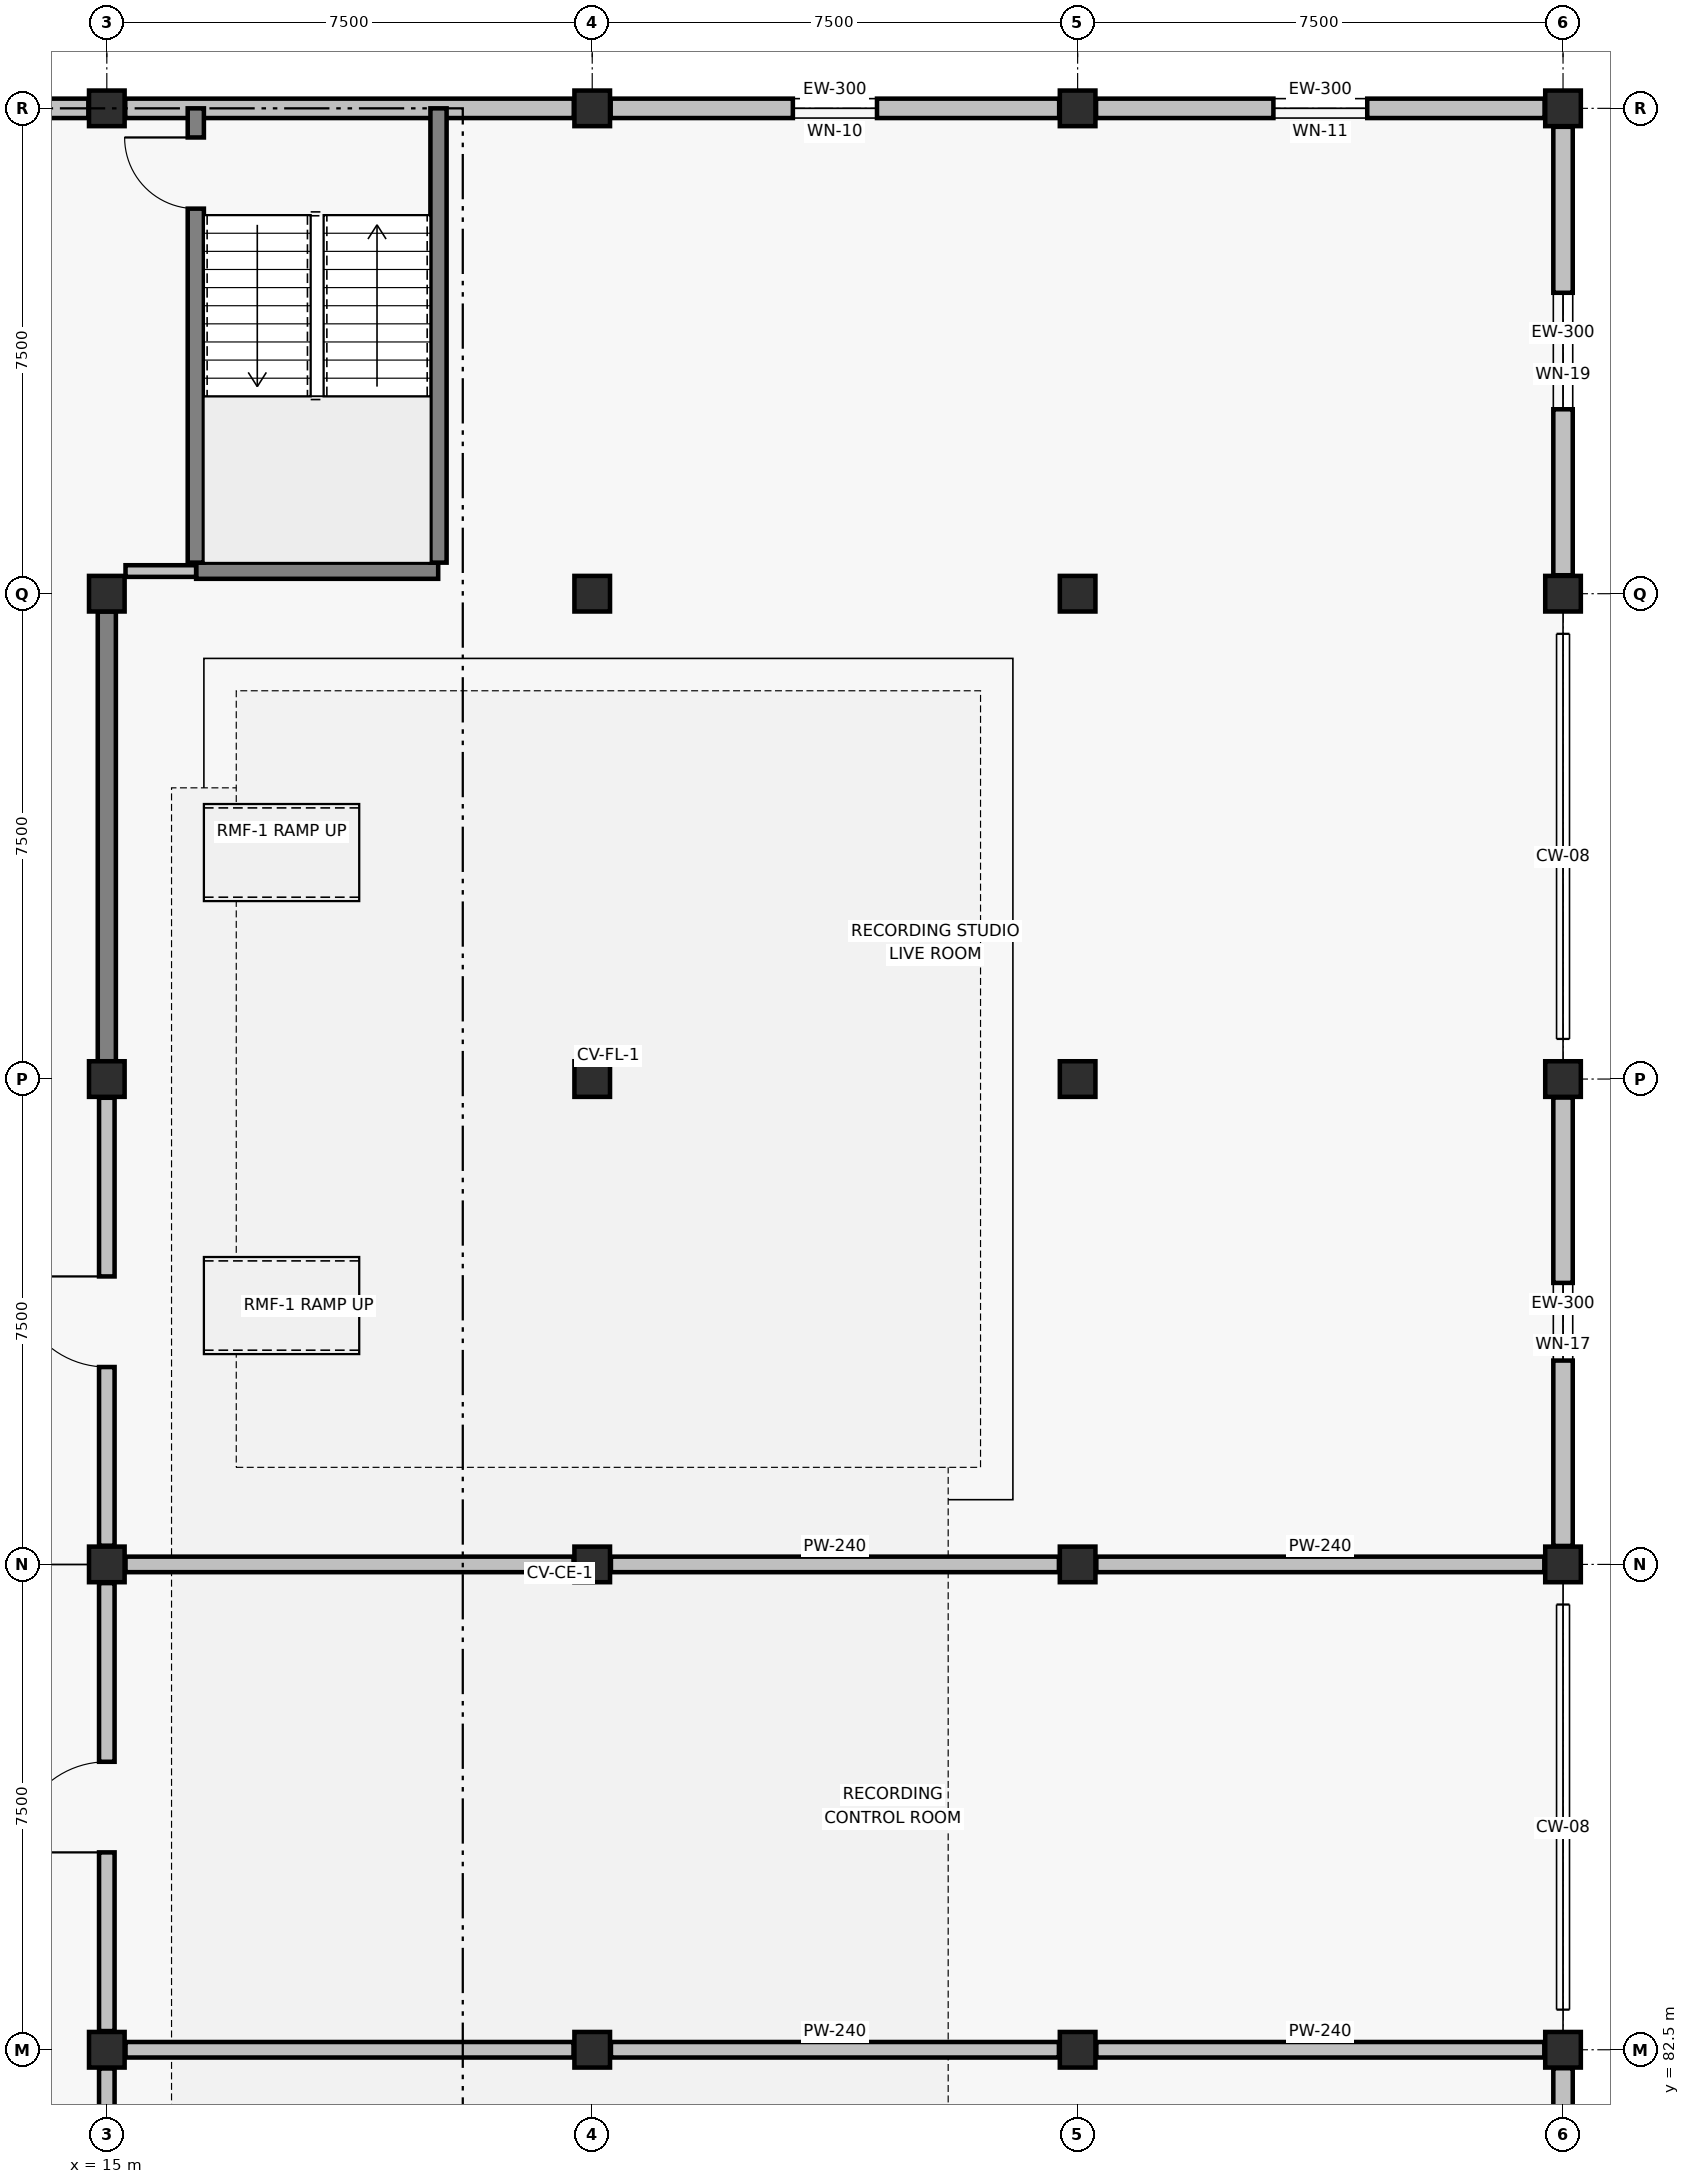
"""IFC4 building model, lengths in metres.
Left out: names, types, materials, properties, quantities, classifications, styles, units other than length and angle.
Written with IfcOpenShell. Run it as: python <this file> out.ifc"""

import sys

from ifc_helpers import new_model, si_unit, direction, frame, frame_2d, origin, origin_2d, place, context, subcontext, project, spatial, rectangle, extrude, element, fill, save


model = new_model("IFC4")
c1 = context("Model", 3, precision=1e-05, world=origin(), true_north=direction((0.0, 1.0)))
c2 = subcontext(c1, "Body", "Model", "MODEL_VIEW")
j1 = project(units=[si_unit("LENGTHUNIT", "METRE"), si_unit("PLANEANGLEUNIT", "RADIAN")], contexts=[c1])
p1 = place(None, origin())
s1 = spatial("IfcSite", under=j1, at=p1, CompositionType="ELEMENT")
p2 = place(p1, origin())
s2 = spatial("IfcBuilding", under=s1, at=p2, CompositionType="ELEMENT")
p3 = place(p2, frame((0.0, 0.0, 13.2)))
s3 = spatial("IfcBuildingStorey", under=s2, at=p3, CompositionType="ELEMENT", Elevation=13.2)
for number, where, z_axis, x_axis in (
    (1, (15.0, 82.5, 0.0), (0.0, 0.0, 1.0), (1.0, 0.0, 0.0)),
    (2, (15.0, 90.0, 0.0), (0.0, 0.0, 1.0), (1.0, 0.0, 0.0)),
    (3, (15.0, 97.5, 0.0), (0.0, 0.0, 1.0), (1.0, 0.0, 0.0)),
    (4, (15.0, 105.0, 0.0), (0.0, 0.0, 1.0), (1.0, 0.0, 0.0)),
    (5, (15.0, 112.5, 0.0), (0.0, 0.0, 1.0), (1.0, 0.0, 0.0)),
    (6, (22.5, 82.5, 0.0), (0.0, 0.0, 1.0), (1.0, 0.0, 0.0)),
    (7, (22.5, 90.0, 0.0), (0.0, 0.0, 1.0), (1.0, 0.0, 0.0)),
    (8, (22.5, 97.5, 0.0), (0.0, 0.0, 1.0), (1.0, 0.0, 0.0)),
    (9, (22.5, 105.0, 0.0), (0.0, 0.0, 1.0), (1.0, 0.0, 0.0)),
    (10, (22.5, 112.5, 0.0), (0.0, 0.0, 1.0), (1.0, 0.0, 0.0)),
    (11, (30.0, 82.5, 0.0), (0.0, 0.0, 1.0), (1.0, 0.0, 0.0)),
    (12, (30.0, 90.0, 0.0), (0.0, 0.0, 1.0), (1.0, 0.0, 0.0)),
    (13, (30.0, 97.5, 0.0), (0.0, 0.0, 1.0), (1.0, 0.0, 0.0)),
    (14, (30.0, 105.0, 0.0), (0.0, 0.0, 1.0), (1.0, 0.0, 0.0)),
    (15, (30.0, 112.5, 0.0), (0.0, 0.0, 1.0), (1.0, 0.0, 0.0)),
    (16, (37.5, 82.5, 0.0), (0.0, 0.0, 1.0), (1.0, 0.0, 0.0)),
    (17, (37.5, 90.0, 0.0), (0.0, 0.0, 1.0), (1.0, 0.0, 0.0)),
    (18, (37.5, 97.5, 0.0), (0.0, 0.0, 1.0), (1.0, 0.0, 0.0)),
    (19, (37.5, 105.0, 0.0), (0.0, 0.0, 1.0), (1.0, 0.0, 0.0)),
    (20, (37.5, 112.5, 0.0), (0.0, 0.0, 1.0), (1.0, 0.0, 0.0)),
):
    element("IfcColumn", number, at=place(p3, frame(where, z_axis=z_axis, x_axis=x_axis)), inside=s3, PredefinedType="COLUMN", context=c2, shape_type="SweptSolid", body=[
        extrude(rectangle(XDim=0.55, YDim=0.55, at=origin_2d()), origin(), (0.0, 0.0, 1.0), 3.9),
    ])
p4 = place(p3, frame((15.0, 97.775, 0.0), z_axis=(0.0, 0.0, 1.0), x_axis=(0.0, 1.0, 0.0)))
e21 = element("IfcWall", 21, at=p4, inside=s3, PredefinedType="SHEAR", context=c2, shape_type="SweptSolid", body=[
    extrude(rectangle(XDim=6.95, YDim=0.28, at=frame_2d((3.475, 0.0))), origin(), (0.0, 0.0, 1.0), 3.6),
])
p5 = place(p3, frame((8.12, 112.5, 0.0), z_axis=(0.0, 0.0, 1.0), x_axis=(1.0, 0.0, 0.0)))
e22 = element("IfcWall", 22, at=p5, inside=s3, PredefinedType="SOLIDWALL", context=c2, shape_type="SweptSolid", body=[
    extrude(rectangle(XDim=6.595, YDim=0.3, at=frame_2d((3.297, 0.0))), origin(), (0.0, 0.0, 1.0), 2.59),
])
p6 = place(p5, frame((2.055, 0.0, 0.6)))
e23 = element("IfcOpeningElement", 23, at=p6, cuts=e22, PredefinedType="OPENING", context=c2, shape_type="SweptSolid", body=[
    extrude(rectangle(XDim=2.15, YDim=1.45, at=frame_2d((1.075, 0.725))), frame((0.0, 0.16, 0.0), z_axis=(0.0, -1.0, 0.0), x_axis=(1.0, 0.0, 0.0)), (0.0, 0.0, 1.0), 0.32),
])
p7 = place(p3, frame((15.285, 112.5, 0.0), z_axis=(0.0, 0.0, 1.0), x_axis=(1.0, 0.0, 0.0)))
e24 = element("IfcWall", 24, at=p7, inside=s3, PredefinedType="SOLIDWALL", context=c2, shape_type="SweptSolid", body=[
    extrude(rectangle(XDim=6.93, YDim=0.3, at=frame_2d((3.465, 0.0))), origin(), (0.0, 0.0, 1.0), 2.59),
])
p8 = place(p3, frame((22.785, 112.5, 0.0), z_axis=(0.0, 0.0, 1.0), x_axis=(1.0, 0.0, 0.0)))
e25 = element("IfcWall", 25, at=p8, inside=s3, PredefinedType="SOLIDWALL", context=c2, shape_type="SweptSolid", body=[
    extrude(rectangle(XDim=6.93, YDim=0.3, at=frame_2d((3.465, 0.0))), origin(), (0.0, 0.0, 1.0), 2.84),
])
p9 = place(p8, frame((2.815, 0.0, 0.6)))
e26 = element("IfcOpeningElement", 26, at=p9, cuts=e25, PredefinedType="OPENING", context=c2, shape_type="SweptSolid", body=[
    extrude(rectangle(XDim=1.3, YDim=1.3, at=frame_2d((0.65, 0.65))), frame((0.0, 0.16, 0.0), z_axis=(0.0, -1.0, 0.0), x_axis=(1.0, 0.0, 0.0)), (0.0, 0.0, 1.0), 0.32),
])
p10 = place(p3, frame((30.285, 112.5, 0.0), z_axis=(0.0, 0.0, 1.0), x_axis=(1.0, 0.0, 0.0)))
e27 = element("IfcWall", 27, at=p10, inside=s3, PredefinedType="SOLIDWALL", context=c2, shape_type="SweptSolid", body=[
    extrude(rectangle(XDim=6.93, YDim=0.3, at=frame_2d((3.465, 0.0))), origin(), (0.0, 0.0, 1.0), 2.84),
])
p11 = place(p10, frame((2.74, 0.0, 0.6)))
e28 = element("IfcOpeningElement", 28, at=p11, cuts=e27, PredefinedType="OPENING", context=c2, shape_type="SweptSolid", body=[
    extrude(rectangle(XDim=1.45, YDim=1.3, at=frame_2d((0.725, 0.65))), frame((0.0, 0.16, 0.0), z_axis=(0.0, -1.0, 0.0), x_axis=(1.0, 0.0, 0.0)), (0.0, 0.0, 1.0), 0.32),
])
p12 = place(p3, frame((37.5, 75.285, 0.0), z_axis=(0.0, 0.0, 1.0), x_axis=(0.0, 1.0, 0.0)))
e29 = element("IfcWall", 29, at=p12, inside=s3, PredefinedType="SOLIDWALL", context=c2, shape_type="SweptSolid", body=[
    extrude(rectangle(XDim=6.93, YDim=0.3, at=frame_2d((3.465, 0.0))), origin(), (0.0, 0.0, 1.0), 2.54),
])
p13 = place(p12, frame((2.415, 0.0, 0.6)))
e30 = element("IfcOpeningElement", 30, at=p13, cuts=e29, PredefinedType="OPENING", context=c2, shape_type="SweptSolid", body=[
    extrude(rectangle(XDim=2.1, YDim=1.3, at=frame_2d((1.05, 0.65))), frame((0.0, 0.16, 0.0), z_axis=(0.0, -1.0, 0.0), x_axis=(1.0, 0.0, 0.0)), (0.0, 0.0, 1.0), 0.32),
])
p14 = place(p3, frame((37.5, 90.285, 0.0), z_axis=(0.0, 0.0, 1.0), x_axis=(0.0, 1.0, 0.0)))
e31 = element("IfcWall", 31, at=p14, inside=s3, PredefinedType="SOLIDWALL", context=c2, shape_type="SweptSolid", body=[
    extrude(rectangle(XDim=6.93, YDim=0.3, at=frame_2d((3.465, 0.0))), origin(), (0.0, 0.0, 1.0), 2.64),
])
p15 = place(p14, frame((2.865, 0.0, 0.6)))
e32 = element("IfcOpeningElement", 32, at=p15, cuts=e31, PredefinedType="OPENING", context=c2, shape_type="SweptSolid", body=[
    extrude(rectangle(XDim=1.2, YDim=1.2, at=frame_2d((0.6, 0.6))), frame((0.0, 0.16, 0.0), z_axis=(0.0, -1.0, 0.0), x_axis=(1.0, 0.0, 0.0)), (0.0, 0.0, 1.0), 0.32),
])
p16 = place(p3, frame((37.5, 105.285, 0.0), z_axis=(0.0, 0.0, 1.0), x_axis=(0.0, 1.0, 0.0)))
e33 = element("IfcWall", 33, at=p16, inside=s3, PredefinedType="SOLIDWALL", context=c2, shape_type="SweptSolid", body=[
    extrude(rectangle(XDim=6.93, YDim=0.3, at=frame_2d((3.465, 0.0))), origin(), (0.0, 0.0, 1.0), 2.79),
])
p17 = place(p16, frame((2.565, 0.0, 0.6)))
e34 = element("IfcOpeningElement", 34, at=p17, cuts=e33, PredefinedType="OPENING", context=c2, shape_type="SweptSolid", body=[
    extrude(rectangle(XDim=1.8, YDim=1.2, at=frame_2d((0.9, 0.6))), frame((0.0, 0.16, 0.0), z_axis=(0.0, -1.0, 0.0), x_axis=(1.0, 0.0, 0.0)), (0.0, 0.0, 1.0), 0.32),
])
p18 = place(p3, frame((16.38, 105.355, 0.0), z_axis=(0.0, 0.0, 1.0), x_axis=(1.0, 0.0, 0.0)))
e35 = element("IfcWall", 35, at=p18, inside=s3, PredefinedType="SOLIDWALL", context=c2, shape_type="SweptSolid", body=[
    extrude(rectangle(XDim=3.74, YDim=0.25, at=frame_2d((1.87, 0.0))), origin(), (0.0, 0.0, 1.0), 3.62),
])
p19 = place(p3, frame((16.375, 105.48, 0.0), z_axis=(0.0, 0.0, 1.0), x_axis=(0.0, 1.0, 0.0)))
e36 = element("IfcWall", 36, at=p19, inside=s3, PredefinedType="SOLIDWALL", context=c2, shape_type="SweptSolid", body=[
    extrude(rectangle(XDim=7.02, YDim=0.25, at=frame_2d((3.51, 0.0))), origin(), (0.0, 0.0, 1.0), 3.62),
])
p20 = place(p19, frame((5.47, 0.0, 0.0)))
e37 = element("IfcOpeningElement", 37, at=p20, cuts=e36, PredefinedType="OPENING", context=c2, shape_type="SweptSolid", body=[
    extrude(rectangle(XDim=1.1, YDim=2.15, at=frame_2d((0.55, 1.075))), frame((0.0, 0.135, 0.0), z_axis=(0.0, -1.0, 0.0), x_axis=(1.0, 0.0, 0.0)), (0.0, 0.0, 1.0), 0.27),
])
p21 = place(p3, frame((20.125, 105.48, 0.0), z_axis=(0.0, 0.0, 1.0), x_axis=(0.0, 1.0, 0.0)))
e38 = element("IfcWall", 38, at=p21, inside=s3, PredefinedType="SOLIDWALL", context=c2, shape_type="SweptSolid", body=[
    extrude(rectangle(XDim=7.02, YDim=0.25, at=frame_2d((3.51, 0.0))), origin(), (0.0, 0.0, 1.0), 3.62),
])
p22 = place(p3, frame((15.289, 105.35, 0.0), z_axis=(0.0, 0.0, 1.0), x_axis=(1.0, 0.0, 0.0)))
e39 = element("IfcWall", 39, at=p22, inside=s3, PredefinedType="PARTITIONING", context=c2, shape_type="SweptSolid", body=[
    extrude(rectangle(XDim=1.091, YDim=0.18, at=frame_2d((0.545, 0.0))), origin(), (0.0, 0.0, 1.0), 2.54),
])
p23 = place(p3, frame((15.289, 82.5, 0.0), z_axis=(0.0, 0.0, 1.0), x_axis=(1.0, 0.0, 0.0)))
e40 = element("IfcWall", 40, at=p23, inside=s3, PredefinedType="PARTITIONING", context=c2, shape_type="SweptSolid", body=[
    extrude(rectangle(XDim=6.922, YDim=0.24, at=frame_2d((3.461, 0.0))), origin(), (0.0, 0.0, 1.0), 2.59),
])
for number, where, z_axis, x_axis in (
    (41, (22.789, 82.5, 0.0), (0.0, 0.0, 1.0), (1.0, 0.0, 0.0)),
    (42, (30.289, 82.5, 0.0), (0.0, 0.0, 1.0), (1.0, 0.0, 0.0)),
    (43, (15.289, 90.0, 0.0), (0.0, 0.0, 1.0), (1.0, 0.0, 0.0)),
    (44, (22.789, 90.0, 0.0), (0.0, 0.0, 1.0), (1.0, 0.0, 0.0)),
    (45, (30.289, 90.0, 0.0), (0.0, 0.0, 1.0), (1.0, 0.0, 0.0)),
):
    element("IfcWall", number, at=place(p3, frame(where, z_axis=z_axis, x_axis=x_axis)), inside=s3, PredefinedType="PARTITIONING", context=c2, shape_type="SweptSolid", body=[
        extrude(rectangle(XDim=6.922, YDim=0.24, at=frame_2d((3.461, 0.0))), origin(), (0.0, 0.0, 1.0), 2.54),
    ])
p24 = place(p3, frame((15.0, 75.289, 0.0), z_axis=(0.0, 0.0, 1.0), x_axis=(0.0, 1.0, 0.0)))
e46 = element("IfcWall", 46, at=p24, inside=s3, PredefinedType="PARTITIONING", context=c2, shape_type="SweptSolid", body=[
    extrude(rectangle(XDim=6.922, YDim=0.24, at=frame_2d((3.461, 0.0))), origin(), (0.0, 0.0, 1.0), 2.59),
])
p25 = place(p24, frame((2.761, 0.0, 0.0)))
e47 = element("IfcOpeningElement", 47, at=p25, cuts=e46, PredefinedType="OPENING", context=c2, shape_type="SweptSolid", body=[
    extrude(rectangle(XDim=1.4, YDim=2.14, at=frame_2d((0.7, 1.07))), frame((0.0, 0.13, 0.0), z_axis=(0.0, -1.0, 0.0), x_axis=(1.0, 0.0, 0.0)), (0.0, 0.0, 1.0), 0.26),
])
p26 = place(p3, frame((15.0, 82.789, 0.0), z_axis=(0.0, 0.0, 1.0), x_axis=(0.0, 1.0, 0.0)))
e48 = element("IfcWall", 48, at=p26, inside=s3, PredefinedType="PARTITIONING", context=c2, shape_type="SweptSolid", body=[
    extrude(rectangle(XDim=6.922, YDim=0.24, at=frame_2d((3.461, 0.0))), origin(), (0.0, 0.0, 1.0), 2.59),
])
p27 = place(p26, frame((2.761, 0.0, 0.0)))
e49 = element("IfcOpeningElement", 49, at=p27, cuts=e48, PredefinedType="OPENING", context=c2, shape_type="SweptSolid", body=[
    extrude(rectangle(XDim=1.4, YDim=2.14, at=frame_2d((0.7, 1.07))), frame((0.0, 0.13, 0.0), z_axis=(0.0, -1.0, 0.0), x_axis=(1.0, 0.0, 0.0)), (0.0, 0.0, 1.0), 0.26),
])
p28 = place(p3, frame((15.0, 90.289, 0.0), z_axis=(0.0, 0.0, 1.0), x_axis=(0.0, 1.0, 0.0)))
e50 = element("IfcWall", 50, at=p28, inside=s3, PredefinedType="PARTITIONING", context=c2, shape_type="SweptSolid", body=[
    extrude(rectangle(XDim=6.922, YDim=0.24, at=frame_2d((3.461, 0.0))), origin(), (0.0, 0.0, 1.0), 2.59),
])
p29 = place(p28, frame((2.761, 0.0, 0.0)))
e51 = element("IfcOpeningElement", 51, at=p29, cuts=e50, PredefinedType="OPENING", context=c2, shape_type="SweptSolid", body=[
    extrude(rectangle(XDim=1.4, YDim=2.14, at=frame_2d((0.7, 1.07))), frame((0.0, 0.13, 0.0), z_axis=(0.0, -1.0, 0.0), x_axis=(1.0, 0.0, 0.0)), (0.0, 0.0, 1.0), 0.26),
])
p30 = place(p9, origin())
e52 = element("IfcWindow", 52, at=p30, inside=s3, PartitioningType="SINGLE_PANEL", PredefinedType="WINDOW", context=c2, shape_type="SweptSolid", body=[
    extrude(rectangle(XDim=1.3, YDim=1.3, at=frame_2d((0.65, 0.65))), frame((0.0, 0.03, 0.0), z_axis=(0.0, -1.0, 0.0), x_axis=(1.0, 0.0, 0.0)), (0.0, 0.0, 1.0), 0.06),
])
fill(e26, e52)
p31 = place(p11, origin())
e53 = element("IfcWindow", 53, at=p31, inside=s3, PartitioningType="SINGLE_PANEL", PredefinedType="WINDOW", context=c2, shape_type="SweptSolid", body=[
    extrude(rectangle(XDim=1.45, YDim=1.3, at=frame_2d((0.725, 0.65))), frame((0.0, 0.03, 0.0), z_axis=(0.0, -1.0, 0.0), x_axis=(1.0, 0.0, 0.0)), (0.0, 0.0, 1.0), 0.06),
])
fill(e28, e53)
p32 = place(p15, origin())
e54 = element("IfcWindow", 54, at=p32, inside=s3, PartitioningType="SINGLE_PANEL", PredefinedType="WINDOW", context=c2, shape_type="SweptSolid", body=[
    extrude(rectangle(XDim=1.2, YDim=1.2, at=frame_2d((0.6, 0.6))), frame((0.0, 0.03, 0.0), z_axis=(0.0, -1.0, 0.0), x_axis=(1.0, 0.0, 0.0)), (0.0, 0.0, 1.0), 0.06),
])
fill(e32, e54)
p33 = place(p17, origin())
e55 = element("IfcWindow", 55, at=p33, inside=s3, PartitioningType="SINGLE_PANEL", PredefinedType="WINDOW", context=c2, shape_type="SweptSolid", body=[
    extrude(rectangle(XDim=1.8, YDim=1.2, at=frame_2d((0.9, 0.6))), frame((0.0, 0.03, 0.0), z_axis=(0.0, -1.0, 0.0), x_axis=(1.0, 0.0, 0.0)), (0.0, 0.0, 1.0), 0.06),
])
fill(e34, e55)
p34 = place(p20, origin())
e56 = element("IfcDoor", 56, at=p34, inside=s3, OperationType="SINGLE_SWING_RIGHT", PredefinedType="DOOR", context=c2, shape_type="SweptSolid", body=[
    extrude(rectangle(XDim=1.1, YDim=2.15, at=frame_2d((0.55, 1.075))), frame((0.0, 0.025, 0.0), z_axis=(0.0, -1.0, 0.0), x_axis=(1.0, 0.0, 0.0)), (0.0, 0.0, 1.0), 0.05),
])
fill(e37, e56)
p35 = place(p27, origin())
e57 = element("IfcDoor", 57, at=p35, inside=s3, OperationType="SINGLE_SWING_LEFT", PredefinedType="DOOR", context=c2, shape_type="SweptSolid", body=[
    extrude(rectangle(XDim=1.4, YDim=2.14, at=frame_2d((0.7, 1.07))), frame((0.0, 0.025, 0.0), z_axis=(0.0, -1.0, 0.0), x_axis=(1.0, 0.0, 0.0)), (0.0, 0.0, 1.0), 0.05),
])
fill(e49, e57)
p36 = place(p29, origin())
e58 = element("IfcDoor", 58, at=p36, inside=s3, OperationType="SINGLE_SWING_RIGHT", PredefinedType="DOOR", context=c2, shape_type="SweptSolid", body=[
    extrude(rectangle(XDim=1.4, YDim=2.14, at=frame_2d((0.7, 1.07))), frame((0.0, 0.025, 0.0), z_axis=(0.0, -1.0, 0.0), x_axis=(1.0, 0.0, 0.0)), (0.0, 0.0, 1.0), 0.05),
])
fill(e51, e58)
save(model, sys.argv[1])
